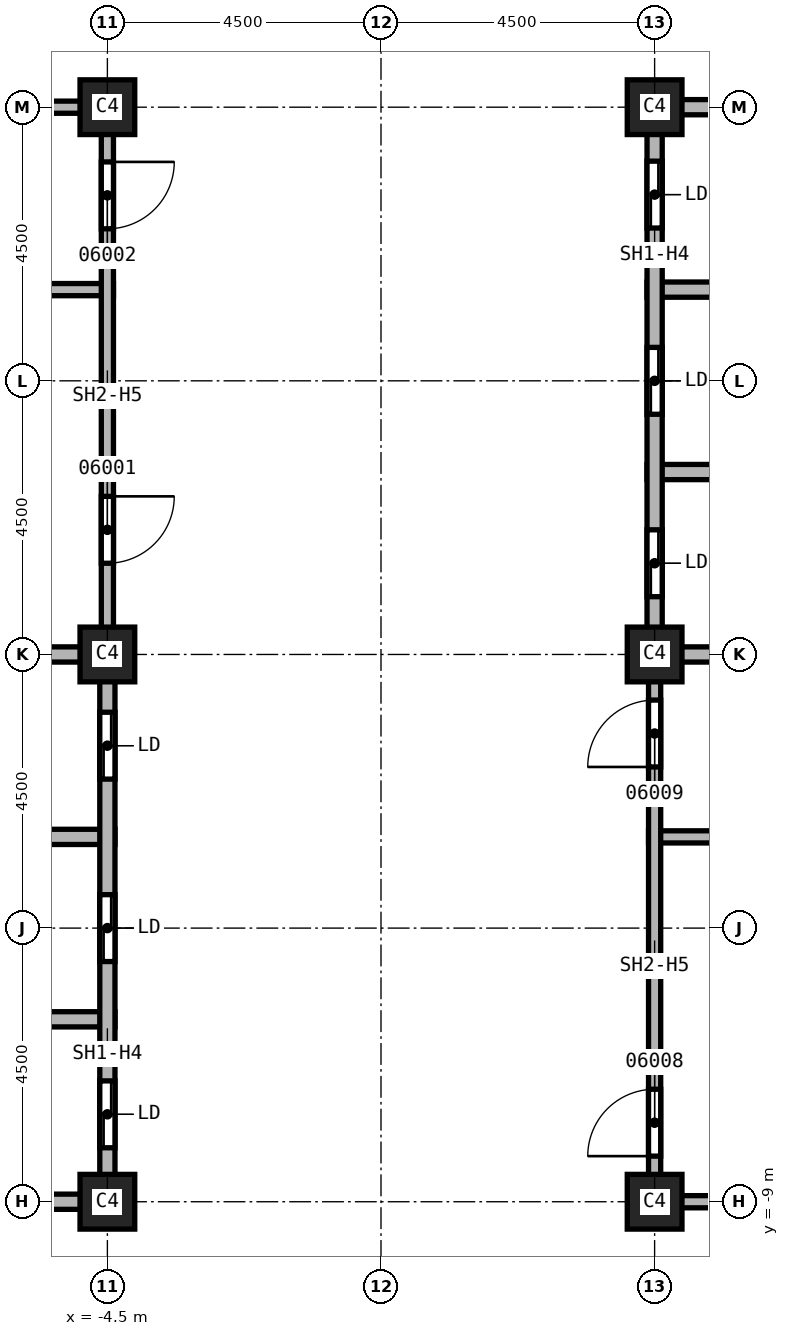
"""IFC4 building model, lengths in metres.
Left out: names, types, materials, properties, quantities, classifications, styles, units other than length and angle.
Written with IfcOpenShell. Run it as: python <this file> out.ifc"""

import sys

from ifc_helpers import new_model, si_unit, direction, frame, frame_2d, origin, origin_2d, place, context, subcontext, project, spatial, rectangle, extrude, element, fill, save


model = new_model("IFC4")
c1 = context("Model", 3, precision=1e-05, world=origin(), true_north=direction((0.0, 1.0)))
c2 = subcontext(c1, "Body", "Model", "MODEL_VIEW")
j1 = project(units=[si_unit("LENGTHUNIT", "METRE"), si_unit("PLANEANGLEUNIT", "RADIAN")], contexts=[c1])
p1 = place(None, origin())
s1 = spatial("IfcSite", under=j1, at=p1, CompositionType="ELEMENT")
p2 = place(p1, origin())
s2 = spatial("IfcBuilding", under=s1, at=p2, CompositionType="ELEMENT")
p3 = place(p2, frame((0.0, 0.0, 130.0)))
s3 = spatial("IfcBuildingStorey", under=s2, at=p3, CompositionType="ELEMENT", Elevation=130.0)
for number, where, z_axis, x_axis in (
    (1, (4.5, 0.0, 0.0), (0.0, 0.0, 1.0), (1.0, 0.0, 0.0)),
    (2, (4.5, 9.0, 0.0), (0.0, 0.0, 1.0), (1.0, 0.0, 0.0)),
    (3, (4.5, -9.0, 0.0), (0.0, 0.0, 1.0), (1.0, 0.0, 0.0)),
    (4, (-4.5, 0.0, 0.0), (0.0, 0.0, 1.0), (1.0, 0.0, 0.0)),
    (5, (-4.5, 9.0, 0.0), (0.0, 0.0, 1.0), (1.0, 0.0, 0.0)),
    (6, (-4.5, -9.0, 0.0), (0.0, 0.0, 1.0), (1.0, 0.0, 0.0)),
):
    element("IfcColumn", number, at=place(p3, frame(where, z_axis=z_axis, x_axis=x_axis)), inside=s3, PredefinedType="COLUMN", context=c2, shape_type="SweptSolid", body=[
        extrude(rectangle(XDim=0.9, YDim=0.9, at=origin_2d()), origin(), (0.0, 0.0, 1.0), 3.7),
    ])
p4 = place(p3, frame((-7.6, 6.0, 0.0), z_axis=(0.0, 0.0, 1.0), x_axis=(1.0, 0.0, 0.0)))
e7 = element("IfcWall", 7, at=p4, inside=s3, PredefinedType="SOLIDWALL", context=c2, shape_type="SweptSolid", body=[
    extrude(rectangle(XDim=3.2, YDim=0.2, at=frame_2d((1.6, 0.0))), origin(), (0.0, 0.0, 1.0), 3.7),
])
p5 = place(p3, frame((-7.5, 9.0, 0.0), z_axis=(0.0, 0.0, 1.0), x_axis=(1.0, 0.0, 0.0)))
e8 = element("IfcWall", 8, at=p5, inside=s3, PredefinedType="SOLIDWALL", context=c2, shape_type="SweptSolid", body=[
    extrude(rectangle(XDim=3.0, YDim=0.2, at=frame_2d((1.5, 0.0))), origin(), (0.0, 0.0, 1.0), 2.938),
])
p6 = place(p3, frame((-4.5, 9.1, 0.0), z_axis=(0.0, 0.0, 1.0), x_axis=(0.0, -1.0, 0.0)))
e9 = element("IfcWall", 9, at=p6, inside=s3, PredefinedType="SOLIDWALL", context=c2, shape_type="SweptSolid", body=[
    extrude(rectangle(XDim=9.1, YDim=0.2, at=frame_2d((4.55, 0.0))), origin(), (0.0, 0.0, 1.0), 2.938),
])
p7 = place(p6, frame((6.5, 0.0, 0.0)))
e10 = element("IfcOpeningElement", 10, at=p7, cuts=e9, PredefinedType="OPENING", context=c2, shape_type="SweptSolid", body=[
    extrude(rectangle(XDim=1.1, YDim=2.1, at=frame_2d((0.55, 1.05))), frame((0.0, 0.1, 0.0), z_axis=(0.0, -1.0, 0.0), x_axis=(1.0, 0.0, 0.0)), (0.0, 0.0, 1.0), 0.2),
])
p8 = place(p6, frame((1.0, 0.0, 0.0)))
e11 = element("IfcOpeningElement", 11, at=p8, cuts=e9, PredefinedType="OPENING", context=c2, shape_type="SweptSolid", body=[
    extrude(rectangle(XDim=1.1, YDim=2.1, at=frame_2d((0.55, 1.05))), frame((0.0, 0.1, 0.0), z_axis=(0.0, -1.0, 0.0), x_axis=(1.0, 0.0, 0.0)), (0.0, 0.0, 1.0), 0.2),
])
p9 = place(p3, frame((4.4, -3.0, 0.0), z_axis=(0.0, 0.0, 1.0), x_axis=(1.0, 0.0, 0.0)))
e12 = element("IfcWall", 12, at=p9, inside=s3, PredefinedType="SOLIDWALL", context=c2, shape_type="SweptSolid", body=[
    extrude(rectangle(XDim=3.225, YDim=0.2, at=frame_2d((1.613, 0.0))), origin(), (0.0, 0.0, 1.0), 3.7),
])
p10 = place(p3, frame((4.5, -9.1, 0.0), z_axis=(0.0, 0.0, 1.0), x_axis=(0.0, 1.0, 0.0)))
e13 = element("IfcWall", 13, at=p10, inside=s3, PredefinedType="SOLIDWALL", context=c2, shape_type="SweptSolid", body=[
    extrude(rectangle(XDim=9.1, YDim=0.2, at=frame_2d((4.55, 0.0))), origin(), (0.0, 0.0, 1.0), 2.938),
])
p11 = place(p10, frame((0.85, 0.0, 0.0)))
e14 = element("IfcOpeningElement", 14, at=p11, cuts=e13, PredefinedType="OPENING", context=c2, shape_type="SweptSolid", body=[
    extrude(rectangle(XDim=1.1, YDim=2.1, at=frame_2d((0.55, 1.05))), frame((0.0, 0.1, 0.0), z_axis=(0.0, -1.0, 0.0), x_axis=(1.0, 0.0, 0.0)), (0.0, 0.0, 1.0), 0.2),
])
p12 = place(p10, frame((7.25, 0.0, 0.0)))
e15 = element("IfcOpeningElement", 15, at=p12, cuts=e13, PredefinedType="OPENING", context=c2, shape_type="SweptSolid", body=[
    extrude(rectangle(XDim=1.1, YDim=2.1, at=frame_2d((0.55, 1.05))), frame((0.0, 0.1, 0.0), z_axis=(0.0, -1.0, 0.0), x_axis=(1.0, 0.0, 0.0)), (0.0, 0.0, 1.0), 0.2),
])
p13 = place(p3, frame((7.5, -9.0, 0.0), z_axis=(0.0, 0.0, 1.0), x_axis=(-1.0, 0.0, 0.0)))
e16 = element("IfcWall", 16, at=p13, inside=s3, PredefinedType="SOLIDWALL", context=c2, shape_type="SweptSolid", body=[
    extrude(rectangle(XDim=3.0, YDim=0.2, at=frame_2d((1.5, 0.0))), origin(), (0.0, 0.0, 1.0), 2.938),
])
p14 = place(p3, frame((-13.625, -3.0, 0.0), z_axis=(0.0, 0.0, 1.0), x_axis=(1.0, 0.0, 0.0)))
e17 = element("IfcWall", 17, at=p14, inside=s3, PredefinedType="SOLIDWALL", context=c2, shape_type="SweptSolid", body=[
    extrude(rectangle(XDim=9.25, YDim=0.25, at=frame_2d((4.625, 0.0))), origin(), (0.0, 0.0, 1.0), 3.7),
])
p15 = place(p14, frame((3.25, 0.0, 0.0)))
e18 = element("IfcOpeningElement", 18, at=p15, cuts=e17, PredefinedType="OPENING", context=c2, shape_type="SweptSolid", body=[
    extrude(rectangle(XDim=1.1, YDim=2.1, at=frame_2d((0.55, 1.05))), frame((0.0, 0.125, 0.0), z_axis=(0.0, -1.0, 0.0), x_axis=(1.0, 0.0, 0.0)), (0.0, 0.0, 1.0), 0.25),
])
for number, where, z_axis, x_axis in (
    (19, (-7.625, -6.0, 0.0), (0.0, 0.0, 1.0), (1.0, 0.0, 0.0)),
    (20, (-7.625, 0.0, 0.0), (0.0, 0.0, 1.0), (1.0, 0.0, 0.0)),
):
    element("IfcWall", number, at=place(p3, frame(where, z_axis=z_axis, x_axis=x_axis)), inside=s3, PredefinedType="SOLIDWALL", context=c2, shape_type="SweptSolid", body=[
        extrude(rectangle(XDim=3.25, YDim=0.25, at=frame_2d((1.625, 0.0))), origin(), (0.0, 0.0, 1.0), 3.7),
    ])
p16 = place(p3, frame((-4.5, -9.0, 0.0), z_axis=(0.0, 0.0, 1.0), x_axis=(-1.0, 0.0, 0.0)))
e21 = element("IfcWall", 21, at=p16, inside=s3, PredefinedType="SOLIDWALL", context=c2, shape_type="SweptSolid", body=[
    extrude(rectangle(XDim=3.0, YDim=0.25, at=frame_2d((1.5, 0.0))), origin(), (0.0, 0.0, 1.0), 2.938),
])
p17 = place(p3, frame((-4.5, 0.0, 0.0), z_axis=(0.0, 0.0, 1.0), x_axis=(0.0, -1.0, 0.0)))
e22 = element("IfcWall", 22, at=p17, inside=s3, PredefinedType="SOLIDWALL", context=c2, shape_type="SweptSolid", body=[
    extrude(rectangle(XDim=9.125, YDim=0.25, at=frame_2d((4.562, 0.0))), origin(), (0.0, 0.0, 1.0), 2.938),
])
p18 = place(p17, frame((7.012, 0.0, 0.0)))
e23 = element("IfcOpeningElement", 23, at=p18, cuts=e22, PredefinedType="OPENING", context=c2, shape_type="SweptSolid", body=[
    extrude(rectangle(XDim=1.1, YDim=2.1, at=frame_2d((0.55, 1.05))), frame((0.0, 0.125, 0.0), z_axis=(0.0, -1.0, 0.0), x_axis=(1.0, 0.0, 0.0)), (0.0, 0.0, 1.0), 0.25),
])
p19 = place(p17, frame((3.95, 0.0, 0.0)))
e24 = element("IfcOpeningElement", 24, at=p19, cuts=e22, PredefinedType="OPENING", context=c2, shape_type="SweptSolid", body=[
    extrude(rectangle(XDim=1.1, YDim=2.1, at=frame_2d((0.55, 1.05))), frame((0.0, 0.125, 0.0), z_axis=(0.0, -1.0, 0.0), x_axis=(1.0, 0.0, 0.0)), (0.0, 0.0, 1.0), 0.25),
])
p20 = place(p17, frame((0.95, 0.0, 0.0)))
e25 = element("IfcOpeningElement", 25, at=p20, cuts=e22, PredefinedType="OPENING", context=c2, shape_type="SweptSolid", body=[
    extrude(rectangle(XDim=1.1, YDim=2.1, at=frame_2d((0.55, 1.05))), frame((0.0, 0.125, 0.0), z_axis=(0.0, -1.0, 0.0), x_axis=(1.0, 0.0, 0.0)), (0.0, 0.0, 1.0), 0.25),
])
p21 = place(p3, frame((4.375, 0.0, 0.0), z_axis=(0.0, 0.0, 1.0), x_axis=(1.0, 0.0, 0.0)))
e26 = element("IfcWall", 26, at=p21, inside=s3, PredefinedType="SOLIDWALL", context=c2, shape_type="SweptSolid", body=[
    extrude(rectangle(XDim=3.25, YDim=0.25, at=frame_2d((1.625, 0.0))), origin(), (0.0, 0.0, 1.0), 3.7),
])
p22 = place(p3, frame((4.375, 3.0, 0.0), z_axis=(0.0, 0.0, 1.0), x_axis=(1.0, 0.0, 0.0)))
e27 = element("IfcWall", 27, at=p22, inside=s3, PredefinedType="SOLIDWALL", context=c2, shape_type="SweptSolid", body=[
    extrude(rectangle(XDim=9.25, YDim=0.25, at=frame_2d((4.625, 0.0))), origin(), (0.0, 0.0, 1.0), 3.7),
])
p23 = place(p22, frame((3.375, 0.0, 0.0)))
e28 = element("IfcOpeningElement", 28, at=p23, cuts=e27, PredefinedType="OPENING", context=c2, shape_type="SweptSolid", body=[
    extrude(rectangle(XDim=1.1, YDim=2.1, at=frame_2d((0.55, 1.05))), frame((0.0, 0.125, 0.0), z_axis=(0.0, -1.0, 0.0), x_axis=(1.0, 0.0, 0.0)), (0.0, 0.0, 1.0), 0.25),
])
p24 = place(p3, frame((4.375, 6.0, 0.0), z_axis=(0.0, 0.0, 1.0), x_axis=(1.0, 0.0, 0.0)))
e29 = element("IfcWall", 29, at=p24, inside=s3, PredefinedType="SOLIDWALL", context=c2, shape_type="SweptSolid", body=[
    extrude(rectangle(XDim=3.25, YDim=0.25, at=frame_2d((1.625, 0.0))), origin(), (0.0, 0.0, 1.0), 3.7),
])
p25 = place(p3, frame((4.5, 0.0, 0.0), z_axis=(0.0, 0.0, 1.0), x_axis=(0.0, 1.0, 0.0)))
e30 = element("IfcWall", 30, at=p25, inside=s3, PredefinedType="SOLIDWALL", context=c2, shape_type="SweptSolid", body=[
    extrude(rectangle(XDim=9.125, YDim=0.25, at=frame_2d((4.562, 0.0))), origin(), (0.0, 0.0, 1.0), 2.938),
])
p26 = place(p25, frame((0.95, 0.0, 0.0)))
e31 = element("IfcOpeningElement", 31, at=p26, cuts=e30, PredefinedType="OPENING", context=c2, shape_type="SweptSolid", body=[
    extrude(rectangle(XDim=1.1, YDim=2.1, at=frame_2d((0.55, 1.05))), frame((0.0, 0.125, 0.0), z_axis=(0.0, -1.0, 0.0), x_axis=(1.0, 0.0, 0.0)), (0.0, 0.0, 1.0), 0.25),
])
p27 = place(p25, frame((3.95, 0.0, 0.0)))
e32 = element("IfcOpeningElement", 32, at=p27, cuts=e30, PredefinedType="OPENING", context=c2, shape_type="SweptSolid", body=[
    extrude(rectangle(XDim=1.1, YDim=2.1, at=frame_2d((0.55, 1.05))), frame((0.0, 0.125, 0.0), z_axis=(0.0, -1.0, 0.0), x_axis=(1.0, 0.0, 0.0)), (0.0, 0.0, 1.0), 0.25),
])
p28 = place(p25, frame((7.012, 0.0, 0.0)))
e33 = element("IfcOpeningElement", 33, at=p28, cuts=e30, PredefinedType="OPENING", context=c2, shape_type="SweptSolid", body=[
    extrude(rectangle(XDim=1.1, YDim=2.1, at=frame_2d((0.55, 1.05))), frame((0.0, 0.125, 0.0), z_axis=(0.0, -1.0, 0.0), x_axis=(1.0, 0.0, 0.0)), (0.0, 0.0, 1.0), 0.25),
])
p29 = place(p3, frame((4.5, 9.0, 0.0), z_axis=(0.0, 0.0, 1.0), x_axis=(1.0, 0.0, 0.0)))
e34 = element("IfcWall", 34, at=p29, inside=s3, PredefinedType="SOLIDWALL", context=c2, shape_type="SweptSolid", body=[
    extrude(rectangle(XDim=3.0, YDim=0.25, at=frame_2d((1.5, 0.0))), origin(), (0.0, 0.0, 1.0), 2.938),
])
p30 = place(p7, origin())
e35 = element("IfcDoor", 35, at=p30, inside=s3, OperationType="SINGLE_SWING_RIGHT", PredefinedType="DOOR", context=c2, shape_type="SweptSolid", body=[
    extrude(rectangle(XDim=1.1, YDim=2.1, at=frame_2d((0.55, 1.05))), frame((0.0, 0.025, 0.0), z_axis=(0.0, -1.0, 0.0), x_axis=(1.0, 0.0, 0.0)), (0.0, 0.0, 1.0), 0.05),
])
fill(e10, e35)
p31 = place(p8, origin())
e36 = element("IfcDoor", 36, at=p31, inside=s3, OperationType="SINGLE_SWING_LEFT", PredefinedType="DOOR", context=c2, shape_type="SweptSolid", body=[
    extrude(rectangle(XDim=1.1, YDim=2.1, at=frame_2d((0.55, 1.05))), frame((0.0, 0.025, 0.0), z_axis=(0.0, -1.0, 0.0), x_axis=(1.0, 0.0, 0.0)), (0.0, 0.0, 1.0), 0.05),
])
fill(e11, e36)
p32 = place(p11, origin())
e37 = element("IfcDoor", 37, at=p32, inside=s3, OperationType="SINGLE_SWING_LEFT", PredefinedType="DOOR", context=c2, shape_type="SweptSolid", body=[
    extrude(rectangle(XDim=1.1, YDim=2.1, at=frame_2d((0.55, 1.05))), frame((0.0, 0.025, 0.0), z_axis=(0.0, -1.0, 0.0), x_axis=(1.0, 0.0, 0.0)), (0.0, 0.0, 1.0), 0.05),
])
fill(e14, e37)
p33 = place(p12, origin())
e38 = element("IfcDoor", 38, at=p33, inside=s3, OperationType="SINGLE_SWING_RIGHT", PredefinedType="DOOR", context=c2, shape_type="SweptSolid", body=[
    extrude(rectangle(XDim=1.1, YDim=2.1, at=frame_2d((0.55, 1.05))), frame((0.0, 0.025, 0.0), z_axis=(0.0, -1.0, 0.0), x_axis=(1.0, 0.0, 0.0)), (0.0, 0.0, 1.0), 0.05),
])
fill(e15, e38)
p34 = place(p18, origin())
e39 = element("IfcDoor", 39, at=p34, inside=s3, OperationType="SLIDING_TO_LEFT", PredefinedType="DOOR", context=c2, shape_type="SweptSolid", body=[
    extrude(rectangle(XDim=1.1, YDim=2.1, at=frame_2d((0.55, 1.05))), frame((0.0, 0.025, 0.0), z_axis=(0.0, -1.0, 0.0), x_axis=(1.0, 0.0, 0.0)), (0.0, 0.0, 1.0), 0.05),
])
fill(e23, e39)
p35 = place(p19, origin())
e40 = element("IfcDoor", 40, at=p35, inside=s3, OperationType="SLIDING_TO_LEFT", PredefinedType="DOOR", context=c2, shape_type="SweptSolid", body=[
    extrude(rectangle(XDim=1.1, YDim=2.1, at=frame_2d((0.55, 1.05))), frame((0.0, 0.025, 0.0), z_axis=(0.0, -1.0, 0.0), x_axis=(1.0, 0.0, 0.0)), (0.0, 0.0, 1.0), 0.05),
])
fill(e24, e40)
p36 = place(p20, origin())
e41 = element("IfcDoor", 41, at=p36, inside=s3, OperationType="SLIDING_TO_LEFT", PredefinedType="DOOR", context=c2, shape_type="SweptSolid", body=[
    extrude(rectangle(XDim=1.1, YDim=2.1, at=frame_2d((0.55, 1.05))), frame((0.0, 0.025, 0.0), z_axis=(0.0, -1.0, 0.0), x_axis=(1.0, 0.0, 0.0)), (0.0, 0.0, 1.0), 0.05),
])
fill(e25, e41)
p37 = place(p26, origin())
e42 = element("IfcDoor", 42, at=p37, inside=s3, OperationType="SLIDING_TO_LEFT", PredefinedType="DOOR", context=c2, shape_type="SweptSolid", body=[
    extrude(rectangle(XDim=1.1, YDim=2.1, at=frame_2d((0.55, 1.05))), frame((0.0, 0.025, 0.0), z_axis=(0.0, -1.0, 0.0), x_axis=(1.0, 0.0, 0.0)), (0.0, 0.0, 1.0), 0.05),
])
fill(e31, e42)
p38 = place(p27, origin())
e43 = element("IfcDoor", 43, at=p38, inside=s3, OperationType="SLIDING_TO_LEFT", PredefinedType="DOOR", context=c2, shape_type="SweptSolid", body=[
    extrude(rectangle(XDim=1.1, YDim=2.1, at=frame_2d((0.55, 1.05))), frame((0.0, 0.025, 0.0), z_axis=(0.0, -1.0, 0.0), x_axis=(1.0, 0.0, 0.0)), (0.0, 0.0, 1.0), 0.05),
])
fill(e32, e43)
p39 = place(p28, origin())
e44 = element("IfcDoor", 44, at=p39, inside=s3, OperationType="SLIDING_TO_LEFT", PredefinedType="DOOR", context=c2, shape_type="SweptSolid", body=[
    extrude(rectangle(XDim=1.1, YDim=2.1, at=frame_2d((0.55, 1.05))), frame((0.0, 0.025, 0.0), z_axis=(0.0, -1.0, 0.0), x_axis=(1.0, 0.0, 0.0)), (0.0, 0.0, 1.0), 0.05),
])
fill(e33, e44)
save(model, sys.argv[1])
